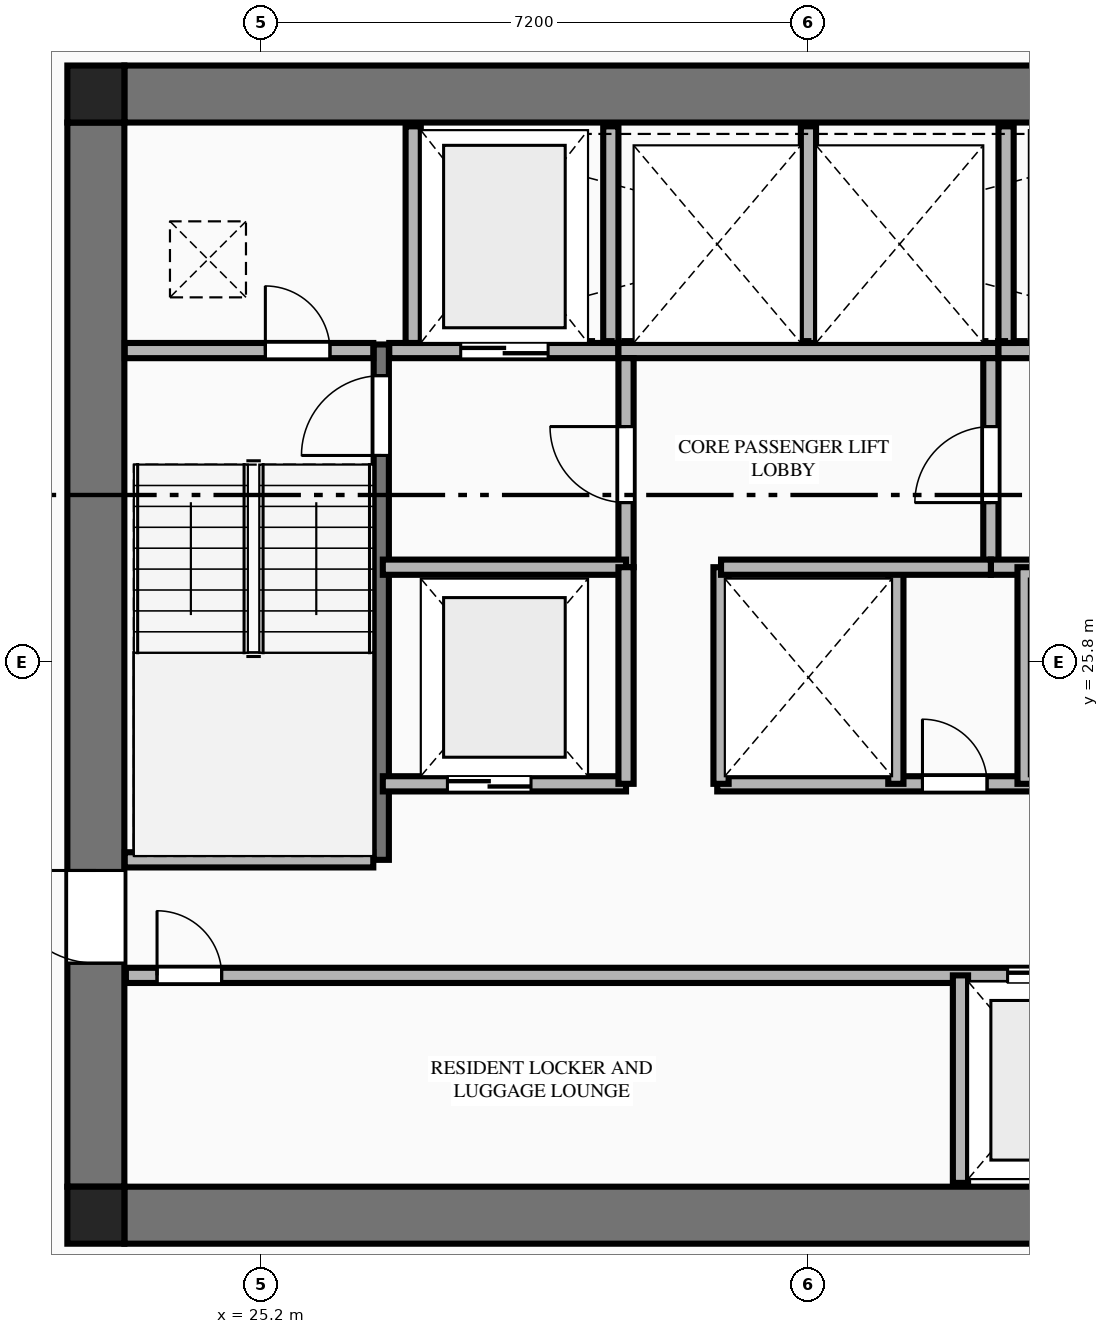
"""IFC4 building model, lengths in metres.
Left out: names, types, materials, properties, quantities, classifications, styles, units other than length and angle.
Written with IfcOpenShell. Run it as: python <this file> out.ifc"""

import sys

from ifc_helpers import new_model, si_unit, direction, frame, frame_2d, origin, origin_2d, place, context, subcontext, project, spatial, rectangle, extrude, element, fill, save


model = new_model("IFC4")
c1 = context("Model", 3, precision=1e-05, world=origin(), true_north=direction((0.0, 1.0)))
c2 = subcontext(c1, "Body", "Model", "MODEL_VIEW")
j1 = project(units=[si_unit("LENGTHUNIT", "METRE"), si_unit("PLANEANGLEUNIT", "RADIAN")], contexts=[c1])
p1 = place(None, origin())
s1 = spatial("IfcSite", under=j1, at=p1, CompositionType="ELEMENT")
p2 = place(p1, origin())
s2 = spatial("IfcBuilding", under=s1, at=p2, CompositionType="ELEMENT")
p3 = place(p2, frame((0.0, 0.0, 112.6)))
s3 = spatial("IfcBuildingStorey", under=s2, at=p3, CompositionType="ELEMENT", Elevation=112.6)
for number, where, z_axis, x_axis in (
    (1, (23.025, 18.525, 0.0), (0.0, 0.0, 1.0), (1.0, 0.0, 0.0)),
    (2, (23.025, 33.275, 0.0), (0.0, 0.0, 1.0), (1.0, 0.0, 0.0)),
):
    element("IfcColumn", number, at=place(p3, frame(where, z_axis=z_axis, x_axis=x_axis)), inside=s3, PredefinedType="COLUMN", context=c2, shape_type="SweptSolid", body=[
        extrude(rectangle(XDim=0.75, YDim=0.75, at=origin_2d()), origin(), (0.0, 0.0, 1.0), 3.55),
    ])
for number, where, z_axis, x_axis in (
    (3, (23.4, 18.525, 0.0), (0.0, 0.0, 1.0), (1.0, 0.0, 0.0)),
    (4, (23.4, 33.275, 0.0), (0.0, 0.0, 1.0), (1.0, 0.0, 0.0)),
):
    element("IfcWall", number, at=place(p3, frame(where, z_axis=z_axis, x_axis=x_axis)), inside=s3, PredefinedType="SHEAR", context=c2, shape_type="SweptSolid", body=[
        extrude(rectangle(XDim=18.0, YDim=0.75, at=frame_2d((9.0, 0.0))), origin(), (0.0, 0.0, 1.0), 3.34),
    ])
p4 = place(p3, frame((23.025, 18.9, 0.0), z_axis=(0.0, 0.0, 1.0), x_axis=(0.0, 1.0, 0.0)))
e5 = element("IfcWall", 5, at=p4, inside=s3, PredefinedType="SHEAR", context=c2, shape_type="SweptSolid", body=[
    extrude(rectangle(XDim=14.0, YDim=0.75, at=frame_2d((7.0, 0.0))), origin(), (0.0, 0.0, 1.0), 3.34),
])
p5 = place(p4, frame((2.94, 0.0, 0.0)))
e6 = element("IfcOpeningElement", 6, at=p5, cuts=e5, PredefinedType="OPENING", context=c2, shape_type="SweptSolid", body=[
    extrude(rectangle(XDim=1.22, YDim=2.25, at=frame_2d((0.61, 1.125))), frame((0.0, 0.385, 0.0), z_axis=(0.0, -1.0, 0.0), x_axis=(1.0, 0.0, 0.0)), (0.0, 0.0, 1.0), 0.77),
])
p6 = place(p3, frame((26.78, 23.2, 0.0), z_axis=(0.0, 0.0, 1.0), x_axis=(0.0, 1.0, 0.0)))
e7 = element("IfcWall", 7, at=p6, inside=s3, PredefinedType="SHEAR", context=c2, shape_type="SweptSolid", body=[
    extrude(rectangle(XDim=6.78, YDim=0.2, at=frame_2d((3.39, 0.0))), origin(), (0.0, 0.0, 1.0), 3.55),
])
p7 = place(p6, frame((5.32, 0.0, 0.0)))
e8 = element("IfcOpeningElement", 8, at=p7, cuts=e7, PredefinedType="OPENING", context=c2, shape_type="SweptSolid", body=[
    extrude(rectangle(XDim=1.05, YDim=2.15, at=frame_2d((0.525, 1.075))), frame((0.0, 0.11, 0.0), z_axis=(0.0, -1.0, 0.0), x_axis=(1.0, 0.0, 0.0)), (0.0, 0.0, 1.0), 0.22),
])
p8 = place(p3, frame((23.405, 23.2, 0.0), z_axis=(0.0, 0.0, 1.0), x_axis=(1.0, 0.0, 0.0)))
e9 = element("IfcWall", 9, at=p8, inside=s3, PredefinedType="PLUMBINGWALL", context=c2, shape_type="SweptSolid", body=[
    extrude(rectangle(XDim=3.27, YDim=0.2, at=frame_2d((1.635, 0.0))), origin(), (0.0, 0.0, 1.0), 3.34),
])
p9 = place(p3, frame((23.405, 29.9, 0.0), z_axis=(0.0, 0.0, 1.0), x_axis=(1.0, 0.0, 0.0)))
e10 = element("IfcWall", 10, at=p9, inside=s3, PredefinedType="PLUMBINGWALL", context=c2, shape_type="SweptSolid", body=[
    extrude(rectangle(XDim=3.27, YDim=0.2, at=frame_2d((1.635, 0.0))), origin(), (0.0, 0.0, 1.0), 3.34),
])
p10 = place(p9, frame((1.85, 0.0, 0.0)))
e11 = element("IfcOpeningElement", 11, at=p10, cuts=e10, PredefinedType="OPENING", context=c2, shape_type="SweptSolid", body=[
    extrude(rectangle(XDim=0.85, YDim=2.05, at=frame_2d((0.425, 1.025))), frame((0.0, 0.11, 0.0), z_axis=(0.0, -1.0, 0.0), x_axis=(1.0, 0.0, 0.0)), (0.0, 0.0, 1.0), 0.22),
])
p11 = place(p3, frame((26.885, 29.9, 0.0), z_axis=(0.0, 0.0, 1.0), x_axis=(1.0, 0.0, 0.0)))
e12 = element("IfcWall", 12, at=p11, inside=s3, PredefinedType="PLUMBINGWALL", context=c2, shape_type="SweptSolid", body=[
    extrude(rectangle(XDim=3.015, YDim=0.2, at=frame_2d((1.507, 0.0))), origin(), (0.0, 0.0, 1.0), 3.34),
])
p12 = place(p11, frame((0.94, 0.0, 0.0)))
e13 = element("IfcOpeningElement", 13, at=p12, cuts=e12, PredefinedType="OPENING", context=c2, shape_type="SweptSolid", body=[
    extrude(rectangle(XDim=1.15, YDim=2.2, at=frame_2d((0.575, 1.1))), frame((0.0, 0.11, 0.0), z_axis=(0.0, -1.0, 0.0), x_axis=(1.0, 0.0, 0.0)), (0.0, 0.0, 1.0), 0.22),
])
p13 = place(p3, frame((29.9, 29.9, 0.0), z_axis=(0.0, 0.0, 1.0), x_axis=(1.0, 0.0, 0.0)))
e14 = element("IfcWall", 14, at=p13, inside=s3, PredefinedType="PLUMBINGWALL", context=c2, shape_type="SweptSolid", body=[
    extrude(rectangle(XDim=5.0, YDim=0.2, at=frame_2d((2.5, 0.0))), origin(), (0.0, 0.0, 1.0), 3.34),
])
p14 = place(p3, frame((34.9, 29.9, 0.0), z_axis=(0.0, 0.0, 1.0), x_axis=(1.0, 0.0, 0.0)))
e15 = element("IfcWall", 15, at=p14, inside=s3, PredefinedType="PLUMBINGWALL", context=c2, shape_type="SweptSolid", body=[
    extrude(rectangle(XDim=3.015, YDim=0.2, at=frame_2d((1.508, 0.0))), origin(), (0.0, 0.0, 1.0), 3.34),
])
p15 = place(p14, frame((0.725, 0.0, 0.0)))
e16 = element("IfcOpeningElement", 16, at=p15, cuts=e15, PredefinedType="OPENING", context=c2, shape_type="SweptSolid", body=[
    extrude(rectangle(XDim=1.15, YDim=2.2, at=frame_2d((0.575, 1.1))), frame((0.0, 0.11, 0.0), z_axis=(0.0, -1.0, 0.0), x_axis=(1.0, 0.0, 0.0)), (0.0, 0.0, 1.0), 0.22),
])
for number, where, z_axis, x_axis in (
    (17, (27.2, 30.0, 0.0), (0.0, 0.0, 1.0), (0.0, 1.0, 0.0)),
    (18, (29.8, 30.0, 0.0), (0.0, 0.0, 1.0), (0.0, 1.0, 0.0)),
    (19, (32.4, 30.0, 0.0), (0.0, 0.0, 1.0), (0.0, 1.0, 0.0)),
    (20, (35.0, 30.0, 0.0), (0.0, 0.0, 1.0), (0.0, 1.0, 0.0)),
):
    element("IfcWall", number, at=place(p3, frame(where, z_axis=z_axis, x_axis=x_axis)), inside=s3, PredefinedType="PLUMBINGWALL", context=c2, shape_type="SweptSolid", body=[
        extrude(rectangle(XDim=2.85, YDim=0.2, at=frame_2d((1.425, 0.0))), origin(), (0.0, 0.0, 1.0), 3.34),
    ])
p16 = place(p3, frame((30.0, 27.05, 0.0), z_axis=(0.0, 0.0, 1.0), x_axis=(0.0, 1.0, 0.0)))
e21 = element("IfcWall", 21, at=p16, inside=s3, PredefinedType="PLUMBINGWALL", context=c2, shape_type="SweptSolid", body=[
    extrude(rectangle(XDim=2.75, YDim=0.2, at=frame_2d((1.375, 0.0))), origin(), (0.0, 0.0, 1.0), 3.34),
])
p17 = place(p16, frame((0.85, 0.0, 0.0)))
e22 = element("IfcOpeningElement", 22, at=p17, cuts=e21, PredefinedType="OPENING", context=c2, shape_type="SweptSolid", body=[
    extrude(rectangle(XDim=1.0, YDim=2.15, at=frame_2d((0.5, 1.075))), frame((0.0, 0.11, 0.0), z_axis=(0.0, -1.0, 0.0), x_axis=(1.0, 0.0, 0.0)), (0.0, 0.0, 1.0), 0.22),
])
p18 = place(p3, frame((26.8, 27.05, 0.0), z_axis=(0.0, 0.0, 1.0), x_axis=(1.0, 0.0, 0.0)))
e23 = element("IfcWall", 23, at=p18, inside=s3, PredefinedType="PLUMBINGWALL", context=c2, shape_type="SweptSolid", body=[
    extrude(rectangle(XDim=3.2, YDim=0.2, at=frame_2d((1.6, 0.0))), origin(), (0.0, 0.0, 1.0), 3.34),
])
p19 = place(p3, frame((34.8, 27.05, 0.0), z_axis=(0.0, 0.0, 1.0), x_axis=(0.0, 1.0, 0.0)))
e24 = element("IfcWall", 24, at=p19, inside=s3, PredefinedType="PLUMBINGWALL", context=c2, shape_type="SweptSolid", body=[
    extrude(rectangle(XDim=2.75, YDim=0.2, at=frame_2d((1.375, 0.0))), origin(), (0.0, 0.0, 1.0), 3.34),
])
p20 = place(p19, frame((0.85, 0.0, 0.0)))
e25 = element("IfcOpeningElement", 25, at=p20, cuts=e24, PredefinedType="OPENING", context=c2, shape_type="SweptSolid", body=[
    extrude(rectangle(XDim=1.0, YDim=2.15, at=frame_2d((0.5, 1.075))), frame((0.0, 0.11, 0.0), z_axis=(0.0, -1.0, 0.0), x_axis=(1.0, 0.0, 0.0)), (0.0, 0.0, 1.0), 0.22),
])
p21 = place(p3, frame((34.8, 27.05, 0.0), z_axis=(0.0, 0.0, 1.0), x_axis=(1.0, 0.0, 0.0)))
e26 = element("IfcWall", 26, at=p21, inside=s3, PredefinedType="PLUMBINGWALL", context=c2, shape_type="SweptSolid", body=[
    extrude(rectangle(XDim=3.2, YDim=0.2, at=frame_2d((1.6, 0.0))), origin(), (0.0, 0.0, 1.0), 3.34),
])
p22 = place(p3, frame((26.8, 24.2, 0.0), z_axis=(0.0, 0.0, 1.0), x_axis=(1.0, 0.0, 0.0)))
e27 = element("IfcWall", 27, at=p22, inside=s3, PredefinedType="PLUMBINGWALL", context=c2, shape_type="SweptSolid", body=[
    extrude(rectangle(XDim=3.2, YDim=0.2, at=frame_2d((1.6, 0.0))), origin(), (0.0, 0.0, 1.0), 3.34),
])
p23 = place(p22, frame((0.85, 0.0, 0.0)))
e28 = element("IfcOpeningElement", 28, at=p23, cuts=e27, PredefinedType="OPENING", context=c2, shape_type="SweptSolid", body=[
    extrude(rectangle(XDim=1.1, YDim=2.2, at=frame_2d((0.55, 1.1))), frame((0.0, 0.11, 0.0), z_axis=(0.0, -1.0, 0.0), x_axis=(1.0, 0.0, 0.0)), (0.0, 0.0, 1.0), 0.22),
])
p24 = place(p3, frame((30.0, 24.2, 0.0), z_axis=(0.0, 0.0, 1.0), x_axis=(0.0, 1.0, 0.0)))
e29 = element("IfcWall", 29, at=p24, inside=s3, PredefinedType="PLUMBINGWALL", context=c2, shape_type="SweptSolid", body=[
    extrude(rectangle(XDim=2.85, YDim=0.2, at=frame_2d((1.425, 0.0))), origin(), (0.0, 0.0, 1.0), 3.34),
])
p25 = place(p3, frame((31.2, 24.2, 0.0), z_axis=(0.0, 0.0, 1.0), x_axis=(1.0, 0.0, 0.0)))
e30 = element("IfcWall", 30, at=p25, inside=s3, PredefinedType="PLUMBINGWALL", context=c2, shape_type="SweptSolid", body=[
    extrude(rectangle(XDim=6.8, YDim=0.2, at=frame_2d((3.4, 0.0))), origin(), (0.0, 0.0, 1.0), 3.34),
])
p26 = place(p25, frame((2.7, 0.0, 0.0)))
e31 = element("IfcOpeningElement", 31, at=p26, cuts=e30, PredefinedType="OPENING", context=c2, shape_type="SweptSolid", body=[
    extrude(rectangle(XDim=0.85, YDim=2.05, at=frame_2d((0.425, 1.025))), frame((0.0, 0.11, 0.0), z_axis=(0.0, -1.0, 0.0), x_axis=(1.0, 0.0, 0.0)), (0.0, 0.0, 1.0), 0.22),
])
p27 = place(p25, frame((4.55, 0.0, 0.0)))
e32 = element("IfcOpeningElement", 32, at=p27, cuts=e30, PredefinedType="OPENING", context=c2, shape_type="SweptSolid", body=[
    extrude(rectangle(XDim=1.1, YDim=2.2, at=frame_2d((0.55, 1.1))), frame((0.0, 0.11, 0.0), z_axis=(0.0, -1.0, 0.0), x_axis=(1.0, 0.0, 0.0)), (0.0, 0.0, 1.0), 0.22),
])
for number, where, z_axis, x_axis in (
    (33, (31.25, 24.2, 0.0), (0.0, 0.0, 1.0), (0.0, 1.0, 0.0)),
    (34, (33.55, 24.2, 0.0), (0.0, 0.0, 1.0), (0.0, 1.0, 0.0)),
    (35, (35.25, 24.2, 0.0), (0.0, 0.0, 1.0), (0.0, 1.0, 0.0)),
):
    element("IfcWall", number, at=place(p3, frame(where, z_axis=z_axis, x_axis=x_axis)), inside=s3, PredefinedType="PLUMBINGWALL", context=c2, shape_type="SweptSolid", body=[
        extrude(rectangle(XDim=2.85, YDim=0.2, at=frame_2d((1.425, 0.0))), origin(), (0.0, 0.0, 1.0), 3.34),
    ])
p28 = place(p3, frame((31.25, 27.05, 0.0), z_axis=(0.0, 0.0, 1.0), x_axis=(1.0, 0.0, 0.0)))
e36 = element("IfcWall", 36, at=p28, inside=s3, PredefinedType="PLUMBINGWALL", context=c2, shape_type="SweptSolid", body=[
    extrude(rectangle(XDim=3.55, YDim=0.2, at=frame_2d((1.775, 0.0))), origin(), (0.0, 0.0, 1.0), 3.34),
])
p29 = place(p3, frame((23.42, 21.68, 0.0), z_axis=(0.0, 0.0, 1.0), x_axis=(1.0, 0.0, 0.0)))
e37 = element("IfcWall", 37, at=p29, inside=s3, PredefinedType="PLUMBINGWALL", context=c2, shape_type="SweptSolid", body=[
    extrude(rectangle(XDim=17.96, YDim=0.2, at=frame_2d((8.98, 0.0))), origin(), (0.0, 0.0, 1.0), 3.34),
])
p30 = place(p29, frame((11.6, 0.0, 0.0)))
e38 = element("IfcOpeningElement", 38, at=p30, cuts=e37, PredefinedType="OPENING", context=c2, shape_type="SweptSolid", body=[
    extrude(rectangle(XDim=1.1, YDim=2.2, at=frame_2d((0.55, 1.1))), frame((0.0, 0.11, 0.0), z_axis=(0.0, -1.0, 0.0), x_axis=(1.0, 0.0, 0.0)), (0.0, 0.0, 1.0), 0.22),
])
p31 = place(p29, frame((0.41, 0.0, 0.0)))
e39 = element("IfcOpeningElement", 39, at=p31, cuts=e37, PredefinedType="OPENING", context=c2, shape_type="SweptSolid", body=[
    extrude(rectangle(XDim=0.85, YDim=2.05, at=frame_2d((0.425, 1.025))), frame((0.0, 0.11, 0.0), z_axis=(0.0, -1.0, 0.0), x_axis=(1.0, 0.0, 0.0)), (0.0, 0.0, 1.0), 0.22),
])
p32 = place(p29, frame((13.78, 0.0, 0.0)))
e40 = element("IfcOpeningElement", 40, at=p32, cuts=e37, PredefinedType="OPENING", context=c2, shape_type="SweptSolid", body=[
    extrude(rectangle(XDim=0.85, YDim=2.05, at=frame_2d((0.425, 1.025))), frame((0.0, 0.11, 0.0), z_axis=(0.0, -1.0, 0.0), x_axis=(1.0, 0.0, 0.0)), (0.0, 0.0, 1.0), 0.22),
])
p33 = place(p29, frame((16.13, 0.0, 0.0)))
e41 = element("IfcOpeningElement", 41, at=p33, cuts=e37, PredefinedType="OPENING", context=c2, shape_type="SweptSolid", body=[
    extrude(rectangle(XDim=0.85, YDim=2.05, at=frame_2d((0.425, 1.025))), frame((0.0, 0.11, 0.0), z_axis=(0.0, -1.0, 0.0), x_axis=(1.0, 0.0, 0.0)), (0.0, 0.0, 1.0), 0.22),
])
p34 = place(p3, frame((34.4, 18.95, 0.0), z_axis=(0.0, 0.0, 1.0), x_axis=(0.0, 1.0, 0.0)))
e42 = element("IfcWall", 42, at=p34, inside=s3, PredefinedType="PLUMBINGWALL", context=c2, shape_type="SweptSolid", body=[
    extrude(rectangle(XDim=2.73, YDim=0.2, at=frame_2d((1.365, 0.0))), origin(), (0.0, 0.0, 1.0), 3.34),
])
p35 = place(p5, origin())
e43 = element("IfcDoor", 43, at=p35, inside=s3, OperationType="SINGLE_SWING_RIGHT", PredefinedType="DOOR", context=c2, shape_type="SweptSolid", body=[
    extrude(rectangle(XDim=1.22, YDim=2.25, at=frame_2d((0.61, 1.125))), frame((0.0, 0.025, 0.0), z_axis=(0.0, -1.0, 0.0), x_axis=(1.0, 0.0, 0.0)), (0.0, 0.0, 1.0), 0.05),
])
fill(e6, e43)
p36 = place(p7, origin())
e44 = element("IfcDoor", 44, at=p36, inside=s3, OperationType="SINGLE_SWING_LEFT", PredefinedType="DOOR", context=c2, shape_type="SweptSolid", body=[
    extrude(rectangle(XDim=1.05, YDim=2.15, at=frame_2d((0.525, 1.075))), frame((0.0, 0.025, 0.0), z_axis=(0.0, -1.0, 0.0), x_axis=(1.0, 0.0, 0.0)), (0.0, 0.0, 1.0), 0.05),
])
fill(e8, e44)
p37 = place(p10, origin())
e45 = element("IfcDoor", 45, at=p37, inside=s3, OperationType="SINGLE_SWING_LEFT", PredefinedType="DOOR", context=c2, shape_type="SweptSolid", body=[
    extrude(rectangle(XDim=0.85, YDim=2.05, at=frame_2d((0.425, 1.025))), frame((0.0, 0.025, 0.0), z_axis=(0.0, -1.0, 0.0), x_axis=(1.0, 0.0, 0.0)), (0.0, 0.0, 1.0), 0.05),
])
fill(e11, e45)
p38 = place(p12, origin())
e46 = element("IfcDoor", 46, at=p38, inside=s3, OperationType="DOUBLE_DOOR_SLIDING", PredefinedType="DOOR", context=c2, shape_type="SweptSolid", body=[
    extrude(rectangle(XDim=1.15, YDim=2.2, at=frame_2d((0.575, 1.1))), frame((0.0, 0.025, 0.0), z_axis=(0.0, -1.0, 0.0), x_axis=(1.0, 0.0, 0.0)), (0.0, 0.0, 1.0), 0.05),
])
fill(e13, e46)
p39 = place(p17, origin())
e47 = element("IfcDoor", 47, at=p39, inside=s3, OperationType="SINGLE_SWING_RIGHT", PredefinedType="DOOR", context=c2, shape_type="SweptSolid", body=[
    extrude(rectangle(XDim=1.0, YDim=2.15, at=frame_2d((0.5, 1.075))), frame((0.0, 0.025, 0.0), z_axis=(0.0, -1.0, 0.0), x_axis=(1.0, 0.0, 0.0)), (0.0, 0.0, 1.0), 0.05),
])
fill(e22, e47)
p40 = place(p20, origin())
e48 = element("IfcDoor", 48, at=p40, inside=s3, OperationType="SINGLE_SWING_LEFT", PredefinedType="DOOR", context=c2, shape_type="SweptSolid", body=[
    extrude(rectangle(XDim=1.0, YDim=2.15, at=frame_2d((0.5, 1.075))), frame((0.0, 0.025, 0.0), z_axis=(0.0, -1.0, 0.0), x_axis=(1.0, 0.0, 0.0)), (0.0, 0.0, 1.0), 0.05),
])
fill(e25, e48)
p41 = place(p23, origin())
e49 = element("IfcDoor", 49, at=p41, inside=s3, OperationType="DOUBLE_DOOR_SLIDING", PredefinedType="DOOR", context=c2, shape_type="SweptSolid", body=[
    extrude(rectangle(XDim=1.1, YDim=2.2, at=frame_2d((0.55, 1.1))), frame((0.0, 0.025, 0.0), z_axis=(0.0, -1.0, 0.0), x_axis=(1.0, 0.0, 0.0)), (0.0, 0.0, 1.0), 0.05),
])
fill(e28, e49)
p42 = place(p26, origin())
e50 = element("IfcDoor", 50, at=p42, inside=s3, OperationType="SINGLE_SWING_LEFT", PredefinedType="DOOR", context=c2, shape_type="SweptSolid", body=[
    extrude(rectangle(XDim=0.85, YDim=2.05, at=frame_2d((0.425, 1.025))), frame((0.0, 0.025, 0.0), z_axis=(0.0, -1.0, 0.0), x_axis=(1.0, 0.0, 0.0)), (0.0, 0.0, 1.0), 0.05),
])
fill(e31, e50)
p43 = place(p30, origin())
e51 = element("IfcDoor", 51, at=p43, inside=s3, OperationType="DOUBLE_DOOR_SLIDING", PredefinedType="DOOR", context=c2, shape_type="SweptSolid", body=[
    extrude(rectangle(XDim=1.1, YDim=2.2, at=frame_2d((0.55, 1.1))), frame((0.0, 0.025, 0.0), z_axis=(0.0, -1.0, 0.0), x_axis=(1.0, 0.0, 0.0)), (0.0, 0.0, 1.0), 0.05),
])
fill(e38, e51)
p44 = place(p31, origin())
e52 = element("IfcDoor", 52, at=p44, inside=s3, OperationType="SINGLE_SWING_LEFT", PredefinedType="DOOR", context=c2, shape_type="SweptSolid", body=[
    extrude(rectangle(XDim=0.85, YDim=2.05, at=frame_2d((0.425, 1.025))), frame((0.0, 0.025, 0.0), z_axis=(0.0, -1.0, 0.0), x_axis=(1.0, 0.0, 0.0)), (0.0, 0.0, 1.0), 0.05),
])
fill(e39, e52)
save(model, sys.argv[1])
